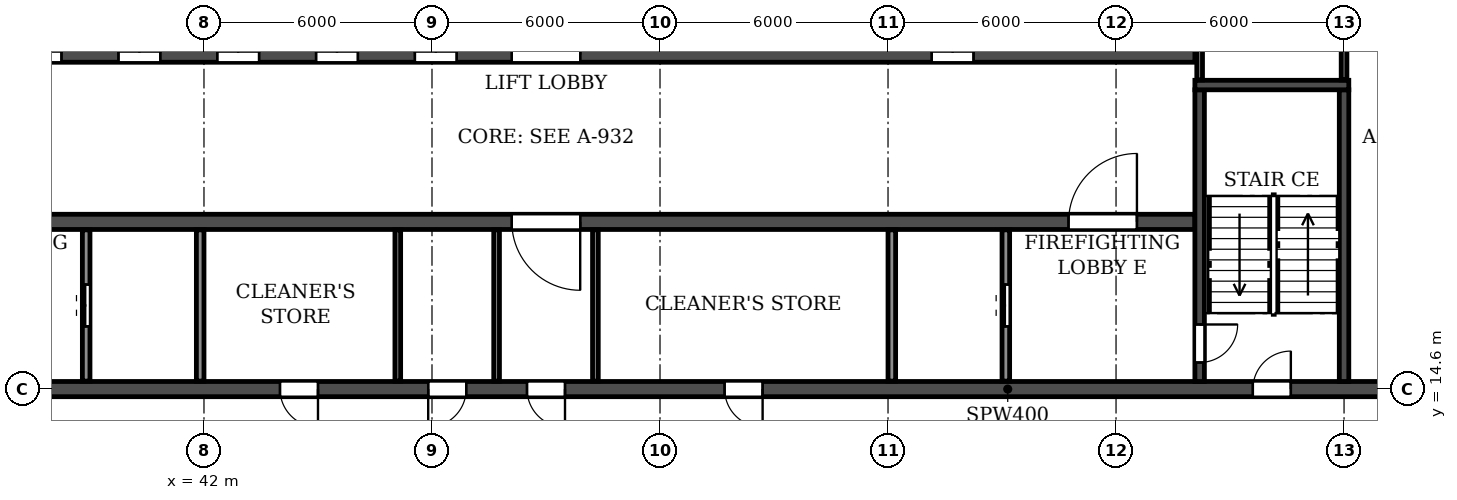
"""IFC4 building model, lengths in metres.
Left out: names, types, materials, properties, quantities, classifications, styles, units other than length and angle.
Written with IfcOpenShell. Run it as: python <this file> out.ifc"""

import sys

from ifc_helpers import new_model, si_unit, direction, frame, frame_2d, origin, place, context, subcontext, project, spatial, rectangle, extrude, element, fill, save


model = new_model("IFC4")
c1 = context("Model", 3, precision=1e-05, world=origin(), true_north=direction((0.0, 1.0)))
c2 = subcontext(c1, "Body", "Model", "MODEL_VIEW")
j1 = project(units=[si_unit("LENGTHUNIT", "METRE"), si_unit("PLANEANGLEUNIT", "RADIAN")], contexts=[c1])
p1 = place(None, origin())
s1 = spatial("IfcSite", under=j1, at=p1, CompositionType="ELEMENT")
p2 = place(p1, origin())
s2 = spatial("IfcBuilding", under=s1, at=p2, CompositionType="ELEMENT")
p3 = place(p2, frame((0.0, 0.0, 171.9)))
s3 = spatial("IfcBuildingStorey", under=s2, at=p3, CompositionType="ELEMENT", Elevation=171.9)
p4 = place(p3, frame((18.2, 14.6, 0.0), z_axis=(0.0, 0.0, 1.0), x_axis=(1.0, 0.0, 0.0)))
e1 = element("IfcWall", 1, at=p4, inside=s3, PredefinedType="SOLIDWALL", context=c2, shape_type="SweptSolid", body=[
    extrude(rectangle(XDim=65.6, YDim=0.4, at=frame_2d((32.8, 0.0))), origin(), (0.0, 0.0, 1.0), 3.08),
])
p5 = place(p4, frame((0.7, 0.0, 0.0)))
e2 = element("IfcOpeningElement", 2, at=p5, cuts=e1, PredefinedType="OPENING", context=c2, shape_type="SweptSolid", body=[
    extrude(rectangle(XDim=1.0, YDim=2.1, at=frame_2d((0.5, 1.05))), frame((0.0, 0.21, 0.0), z_axis=(0.0, -1.0, 0.0), x_axis=(1.0, 0.0, 0.0)), (0.0, 0.0, 1.0), 0.42),
])
p6 = place(p4, frame((8.6, 0.0, 0.0)))
e3 = element("IfcOpeningElement", 3, at=p6, cuts=e1, PredefinedType="OPENING", context=c2, shape_type="SweptSolid", body=[
    extrude(rectangle(XDim=1.0, YDim=2.1, at=frame_2d((0.5, 1.05))), frame((0.0, 0.21, 0.0), z_axis=(0.0, -1.0, 0.0), x_axis=(1.0, 0.0, 0.0)), (0.0, 0.0, 1.0), 0.42),
])
p7 = place(p4, frame((13.2, 0.0, 0.0)))
e4 = element("IfcOpeningElement", 4, at=p7, cuts=e1, PredefinedType="OPENING", context=c2, shape_type="SweptSolid", body=[
    extrude(rectangle(XDim=1.0, YDim=2.1, at=frame_2d((0.5, 1.05))), frame((0.0, 0.21, 0.0), z_axis=(0.0, -1.0, 0.0), x_axis=(1.0, 0.0, 0.0)), (0.0, 0.0, 1.0), 0.42),
])
p8 = place(p4, frame((25.8, 0.0, 0.0)))
e5 = element("IfcOpeningElement", 5, at=p8, cuts=e1, PredefinedType="OPENING", context=c2, shape_type="SweptSolid", body=[
    extrude(rectangle(XDim=1.0, YDim=2.1, at=frame_2d((0.5, 1.05))), frame((0.0, 0.21, 0.0), z_axis=(0.0, -1.0, 0.0), x_axis=(1.0, 0.0, 0.0)), (0.0, 0.0, 1.0), 0.42),
])
p9 = place(p4, frame((29.7, 0.0, 0.0)))
e6 = element("IfcOpeningElement", 6, at=p9, cuts=e1, PredefinedType="OPENING", context=c2, shape_type="SweptSolid", body=[
    extrude(rectangle(XDim=1.0, YDim=2.1, at=frame_2d((0.5, 1.05))), frame((0.0, 0.21, 0.0), z_axis=(0.0, -1.0, 0.0), x_axis=(1.0, 0.0, 0.0)), (0.0, 0.0, 1.0), 0.42),
])
p10 = place(p4, frame((32.3, 0.0, 0.0)))
e7 = element("IfcOpeningElement", 7, at=p10, cuts=e1, PredefinedType="OPENING", context=c2, shape_type="SweptSolid", body=[
    extrude(rectangle(XDim=1.0, YDim=2.1, at=frame_2d((0.5, 1.05))), frame((0.0, 0.21, 0.0), z_axis=(0.0, -1.0, 0.0), x_axis=(1.0, 0.0, 0.0)), (0.0, 0.0, 1.0), 0.42),
])
p11 = place(p4, frame((37.5, 0.0, 0.0)))
e8 = element("IfcOpeningElement", 8, at=p11, cuts=e1, PredefinedType="OPENING", context=c2, shape_type="SweptSolid", body=[
    extrude(rectangle(XDim=1.0, YDim=2.1, at=frame_2d((0.5, 1.05))), frame((0.0, 0.21, 0.0), z_axis=(0.0, -1.0, 0.0), x_axis=(1.0, 0.0, 0.0)), (0.0, 0.0, 1.0), 0.42),
])
p12 = place(p4, frame((51.4, 0.0, 0.0)))
e9 = element("IfcOpeningElement", 9, at=p12, cuts=e1, PredefinedType="OPENING", context=c2, shape_type="SweptSolid", body=[
    extrude(rectangle(XDim=1.0, YDim=2.1, at=frame_2d((0.5, 1.05))), frame((0.0, 0.21, 0.0), z_axis=(0.0, -1.0, 0.0), x_axis=(1.0, 0.0, 0.0)), (0.0, 0.0, 1.0), 0.42),
])
p13 = place(p4, frame((56.0, 0.0, 0.0)))
e10 = element("IfcOpeningElement", 10, at=p13, cuts=e1, PredefinedType="OPENING", context=c2, shape_type="SweptSolid", body=[
    extrude(rectangle(XDim=1.0, YDim=2.1, at=frame_2d((0.5, 1.05))), frame((0.0, 0.21, 0.0), z_axis=(0.0, -1.0, 0.0), x_axis=(1.0, 0.0, 0.0)), (0.0, 0.0, 1.0), 0.42),
])
p14 = place(p4, frame((63.9, 0.0, 0.0)))
e11 = element("IfcOpeningElement", 11, at=p14, cuts=e1, PredefinedType="OPENING", context=c2, shape_type="SweptSolid", body=[
    extrude(rectangle(XDim=1.0, YDim=2.1, at=frame_2d((0.5, 1.05))), frame((0.0, 0.21, 0.0), z_axis=(0.0, -1.0, 0.0), x_axis=(1.0, 0.0, 0.0)), (0.0, 0.0, 1.0), 0.42),
])
p15 = place(p3, frame((33.925, 19.0, 0.0), z_axis=(0.0, 0.0, 1.0), x_axis=(1.0, 0.0, 0.0)))
e12 = element("IfcWall", 12, at=p15, inside=s3, PredefinedType="SOLIDWALL", context=c2, shape_type="SweptSolid", body=[
    extrude(rectangle(XDim=34.15, YDim=0.4, at=frame_2d((17.075, 0.0))), origin(), (0.0, 0.0, 1.0), 3.08),
])
p16 = place(p15, frame((16.175, 0.0, 0.0)))
e13 = element("IfcOpeningElement", 13, at=p16, cuts=e12, PredefinedType="OPENING", context=c2, shape_type="SweptSolid", body=[
    extrude(rectangle(XDim=1.8, YDim=2.1, at=frame_2d((0.9, 1.05))), frame((0.0, 0.21, 0.0), z_axis=(0.0, -1.0, 0.0), x_axis=(1.0, 0.0, 0.0)), (0.0, 0.0, 1.0), 0.42),
])
p17 = place(p15, frame((1.525, 0.0, 0.0)))
e14 = element("IfcOpeningElement", 14, at=p17, cuts=e12, PredefinedType="OPENING", context=c2, shape_type="SweptSolid", body=[
    extrude(rectangle(XDim=1.8, YDim=2.1, at=frame_2d((0.9, 1.05))), frame((0.0, 0.21, 0.0), z_axis=(0.0, -1.0, 0.0), x_axis=(1.0, 0.0, 0.0)), (0.0, 0.0, 1.0), 0.42),
])
p18 = place(p15, frame((30.825, 0.0, 0.0)))
e15 = element("IfcOpeningElement", 15, at=p18, cuts=e12, PredefinedType="OPENING", context=c2, shape_type="SweptSolid", body=[
    extrude(rectangle(XDim=1.8, YDim=2.1, at=frame_2d((0.9, 1.05))), frame((0.0, 0.21, 0.0), z_axis=(0.0, -1.0, 0.0), x_axis=(1.0, 0.0, 0.0)), (0.0, 0.0, 1.0), 0.42),
])
p19 = place(p3, frame((33.925, 23.4, 0.0), z_axis=(0.0, 0.0, 1.0), x_axis=(1.0, 0.0, 0.0)))
e16 = element("IfcWall", 16, at=p19, inside=s3, PredefinedType="SOLIDWALL", context=c2, shape_type="SweptSolid", body=[
    extrude(rectangle(XDim=34.15, YDim=0.4, at=frame_2d((17.075, 0.0))), origin(), (0.0, 0.0, 1.0), 3.08),
])
p20 = place(p19, frame((16.175, 0.0, 0.0)))
e17 = element("IfcOpeningElement", 17, at=p20, cuts=e16, PredefinedType="OPENING", context=c2, shape_type="SweptSolid", body=[
    extrude(rectangle(XDim=1.8, YDim=2.1, at=frame_2d((0.9, 1.05))), frame((0.0, 0.21, 0.0), z_axis=(0.0, -1.0, 0.0), x_axis=(1.0, 0.0, 0.0)), (0.0, 0.0, 1.0), 0.42),
])
p21 = place(p19, frame((0.625, 0.0, 0.0)))
e18 = element("IfcOpeningElement", 18, at=p21, cuts=e16, PredefinedType="OPENING", context=c2, shape_type="SweptSolid", body=[
    extrude(rectangle(XDim=1.1, YDim=2.1, at=frame_2d((0.55, 1.05))), frame((0.0, 0.21, 0.0), z_axis=(0.0, -1.0, 0.0), x_axis=(1.0, 0.0, 0.0)), (0.0, 0.0, 1.0), 0.42),
])
p22 = place(p19, frame((3.225, 0.0, 0.0)))
e19 = element("IfcOpeningElement", 19, at=p22, cuts=e16, PredefinedType="OPENING", context=c2, shape_type="SweptSolid", body=[
    extrude(rectangle(XDim=1.1, YDim=2.1, at=frame_2d((0.55, 1.05))), frame((0.0, 0.21, 0.0), z_axis=(0.0, -1.0, 0.0), x_axis=(1.0, 0.0, 0.0)), (0.0, 0.0, 1.0), 0.42),
])
p23 = place(p19, frame((5.825, 0.0, 0.0)))
e20 = element("IfcOpeningElement", 20, at=p23, cuts=e16, PredefinedType="OPENING", context=c2, shape_type="SweptSolid", body=[
    extrude(rectangle(XDim=1.1, YDim=2.1, at=frame_2d((0.55, 1.05))), frame((0.0, 0.21, 0.0), z_axis=(0.0, -1.0, 0.0), x_axis=(1.0, 0.0, 0.0)), (0.0, 0.0, 1.0), 0.42),
])
p24 = place(p19, frame((8.425, 0.0, 0.0)))
e21 = element("IfcOpeningElement", 21, at=p24, cuts=e16, PredefinedType="OPENING", context=c2, shape_type="SweptSolid", body=[
    extrude(rectangle(XDim=1.1, YDim=2.1, at=frame_2d((0.55, 1.05))), frame((0.0, 0.21, 0.0), z_axis=(0.0, -1.0, 0.0), x_axis=(1.0, 0.0, 0.0)), (0.0, 0.0, 1.0), 0.42),
])
p25 = place(p19, frame((11.025, 0.0, 0.0)))
e22 = element("IfcOpeningElement", 22, at=p25, cuts=e16, PredefinedType="OPENING", context=c2, shape_type="SweptSolid", body=[
    extrude(rectangle(XDim=1.1, YDim=2.1, at=frame_2d((0.55, 1.05))), frame((0.0, 0.21, 0.0), z_axis=(0.0, -1.0, 0.0), x_axis=(1.0, 0.0, 0.0)), (0.0, 0.0, 1.0), 0.42),
])
p26 = place(p19, frame((13.625, 0.0, 0.0)))
e23 = element("IfcOpeningElement", 23, at=p26, cuts=e16, PredefinedType="OPENING", context=c2, shape_type="SweptSolid", body=[
    extrude(rectangle(XDim=1.1, YDim=2.1, at=frame_2d((0.55, 1.05))), frame((0.0, 0.21, 0.0), z_axis=(0.0, -1.0, 0.0), x_axis=(1.0, 0.0, 0.0)), (0.0, 0.0, 1.0), 0.42),
])
p27 = place(p19, frame((27.225, 0.0, 0.0)))
e24 = element("IfcOpeningElement", 24, at=p27, cuts=e16, PredefinedType="OPENING", context=c2, shape_type="SweptSolid", body=[
    extrude(rectangle(XDim=1.1, YDim=2.1, at=frame_2d((0.55, 1.05))), frame((0.0, 0.21, 0.0), z_axis=(0.0, -1.0, 0.0), x_axis=(1.0, 0.0, 0.0)), (0.0, 0.0, 1.0), 0.42),
])
p28 = place(p3, frame((68.2, 14.8, 0.0), z_axis=(0.0, 0.0, 1.0), x_axis=(0.0, 1.0, 0.0)))
e25 = element("IfcWall", 25, at=p28, inside=s3, PredefinedType="SOLIDWALL", context=c2, shape_type="SweptSolid", body=[
    extrude(rectangle(XDim=7.675, YDim=0.25, at=frame_2d((3.837, 0.0))), origin(), (0.0, 0.0, 1.0), 3.08),
])
p29 = place(p28, frame((0.5, 0.0, 0.0)))
e26 = element("IfcOpeningElement", 26, at=p29, cuts=e25, PredefinedType="OPENING", context=c2, shape_type="SweptSolid", body=[
    extrude(rectangle(XDim=1.0, YDim=2.1, at=frame_2d((0.5, 1.05))), frame((0.0, 0.135, 0.0), z_axis=(0.0, -1.0, 0.0), x_axis=(1.0, 0.0, 0.0)), (0.0, 0.0, 1.0), 0.27),
])
p30 = place(p3, frame((72.0, 14.8, 0.0), z_axis=(0.0, 0.0, 1.0), x_axis=(0.0, 1.0, 0.0)))
e27 = element("IfcWall", 27, at=p30, inside=s3, PredefinedType="SOLIDWALL", context=c2, shape_type="SweptSolid", body=[
    extrude(rectangle(XDim=7.675, YDim=0.25, at=frame_2d((3.837, 0.0))), origin(), (0.0, 0.0, 1.0), 3.08),
])
p31 = place(p3, frame((68.075, 22.6, 0.0), z_axis=(0.0, 0.0, 1.0), x_axis=(1.0, 0.0, 0.0)))
e28 = element("IfcWall", 28, at=p31, inside=s3, PredefinedType="SOLIDWALL", context=c2, shape_type="SweptSolid", body=[
    extrude(rectangle(XDim=4.05, YDim=0.25, at=frame_2d((2.025, 0.0))), origin(), (0.0, 0.0, 1.0), 3.08),
])
for number, where, z_axis, x_axis in (
    (29, (49.7, 14.81, 0.0), (0.0, 0.0, 1.0), (0.0, 1.0, 0.0)),
    (30, (52.3, 14.81, 0.0), (0.0, 0.0, 1.0), (0.0, 1.0, 0.0)),
    (31, (47.1, 14.81, 0.0), (0.0, 0.0, 1.0), (0.0, 1.0, 0.0)),
):
    element("IfcWall", number, at=place(p3, frame(where, z_axis=z_axis, x_axis=x_axis)), inside=s3, PredefinedType="PARTITIONING", context=c2, shape_type="SweptSolid", body=[
        extrude(rectangle(XDim=3.98, YDim=0.15, at=frame_2d((1.99, 0.0))), origin(), (0.0, 0.0, 1.0), 3.08),
    ])
for number, where, z_axis, x_axis in (
    (32, (68.2, 22.735, 0.0), (0.0, 0.0, 1.0), (0.0, 1.0, 0.0)),
    (33, (72.0, 22.735, 0.0), (0.0, 0.0, 1.0), (0.0, 1.0, 0.0)),
):
    element("IfcWall", number, at=place(p3, frame(where, z_axis=z_axis, x_axis=x_axis)), inside=s3, PredefinedType="PARTITIONING", context=c2, shape_type="SweptSolid", body=[
        extrude(rectangle(XDim=4.855, YDim=0.15, at=frame_2d((2.427, 0.0))), origin(), (0.0, 0.0, 1.0), 3.08),
    ])
p32 = place(p3, frame((38.9, 14.81, 0.0), z_axis=(0.0, 0.0, 1.0), x_axis=(0.0, 1.0, 0.0)))
e34 = element("IfcWall", 34, at=p32, inside=s3, PredefinedType="PARTITIONING", context=c2, shape_type="SweptSolid", body=[
    extrude(rectangle(XDim=3.98, YDim=0.2, at=frame_2d((1.99, 0.0))), origin(), (0.0, 0.0, 1.0), 3.08),
])
p33 = place(p32, frame((1.44, 0.0, 0.0)))
e35 = element("IfcOpeningElement", 35, at=p33, cuts=e34, PredefinedType="OPENING", context=c2, shape_type="SweptSolid", body=[
    extrude(rectangle(XDim=1.1, YDim=2.1, at=frame_2d((0.55, 1.05))), frame((0.0, 0.11, 0.0), z_axis=(0.0, -1.0, 0.0), x_axis=(1.0, 0.0, 0.0)), (0.0, 0.0, 1.0), 0.22),
])
for number, where, z_axis, x_axis in (
    (36, (41.9, 14.81, 0.0), (0.0, 0.0, 1.0), (0.0, 1.0, 0.0)),
    (37, (60.1, 14.81, 0.0), (0.0, 0.0, 1.0), (0.0, 1.0, 0.0)),
):
    element("IfcWall", number, at=place(p3, frame(where, z_axis=z_axis, x_axis=x_axis)), inside=s3, PredefinedType="PARTITIONING", context=c2, shape_type="SweptSolid", body=[
        extrude(rectangle(XDim=3.98, YDim=0.2, at=frame_2d((1.99, 0.0))), origin(), (0.0, 0.0, 1.0), 3.08),
    ])
p34 = place(p3, frame((63.1, 14.81, 0.0), z_axis=(0.0, 0.0, 1.0), x_axis=(0.0, 1.0, 0.0)))
e38 = element("IfcWall", 38, at=p34, inside=s3, PredefinedType="PARTITIONING", context=c2, shape_type="SweptSolid", body=[
    extrude(rectangle(XDim=3.98, YDim=0.2, at=frame_2d((1.99, 0.0))), origin(), (0.0, 0.0, 1.0), 3.08),
])
p35 = place(p34, frame((1.44, 0.0, 0.0)))
e39 = element("IfcOpeningElement", 39, at=p35, cuts=e38, PredefinedType="OPENING", context=c2, shape_type="SweptSolid", body=[
    extrude(rectangle(XDim=1.1, YDim=2.1, at=frame_2d((0.55, 1.05))), frame((0.0, 0.11, 0.0), z_axis=(0.0, -1.0, 0.0), x_axis=(1.0, 0.0, 0.0)), (0.0, 0.0, 1.0), 0.22),
])
p36 = place(p8, frame((1.0, 0.0, 0.0), z_axis=(0.0, 0.0, 1.0), x_axis=(-1.0, 0.0, 0.0)))
e40 = element("IfcDoor", 40, at=p36, inside=s3, OperationType="SINGLE_SWING_LEFT", PredefinedType="DOOR", context=c2, shape_type="SweptSolid", body=[
    extrude(rectangle(XDim=1.0, YDim=2.1, at=frame_2d((0.5, 1.05))), frame((0.0, 0.025, 0.0), z_axis=(0.0, -1.0, 0.0), x_axis=(1.0, 0.0, 0.0)), (0.0, 0.0, 1.0), 0.05),
])
fill(e5, e40)
p37 = place(p9, frame((1.0, 0.0, 0.0), z_axis=(0.0, 0.0, 1.0), x_axis=(-1.0, 0.0, 0.0)))
e41 = element("IfcDoor", 41, at=p37, inside=s3, OperationType="SINGLE_SWING_RIGHT", PredefinedType="DOOR", context=c2, shape_type="SweptSolid", body=[
    extrude(rectangle(XDim=1.0, YDim=2.1, at=frame_2d((0.5, 1.05))), frame((0.0, 0.025, 0.0), z_axis=(0.0, -1.0, 0.0), x_axis=(1.0, 0.0, 0.0)), (0.0, 0.0, 1.0), 0.05),
])
fill(e6, e41)
p38 = place(p10, frame((1.0, 0.0, 0.0), z_axis=(0.0, 0.0, 1.0), x_axis=(-1.0, 0.0, 0.0)))
e42 = element("IfcDoor", 42, at=p38, inside=s3, OperationType="SINGLE_SWING_LEFT", PredefinedType="DOOR", context=c2, shape_type="SweptSolid", body=[
    extrude(rectangle(XDim=1.0, YDim=2.1, at=frame_2d((0.5, 1.05))), frame((0.0, 0.025, 0.0), z_axis=(0.0, -1.0, 0.0), x_axis=(1.0, 0.0, 0.0)), (0.0, 0.0, 1.0), 0.05),
])
fill(e7, e42)
p39 = place(p11, frame((1.0, 0.0, 0.0), z_axis=(0.0, 0.0, 1.0), x_axis=(-1.0, 0.0, 0.0)))
e43 = element("IfcDoor", 43, at=p39, inside=s3, OperationType="SINGLE_SWING_LEFT", PredefinedType="DOOR", context=c2, shape_type="SweptSolid", body=[
    extrude(rectangle(XDim=1.0, YDim=2.1, at=frame_2d((0.5, 1.05))), frame((0.0, 0.025, 0.0), z_axis=(0.0, -1.0, 0.0), x_axis=(1.0, 0.0, 0.0)), (0.0, 0.0, 1.0), 0.05),
])
fill(e8, e43)
p40 = place(p12, origin())
e44 = element("IfcDoor", 44, at=p40, inside=s3, OperationType="SINGLE_SWING_RIGHT", PredefinedType="DOOR", context=c2, shape_type="SweptSolid", body=[
    extrude(rectangle(XDim=1.0, YDim=2.1, at=frame_2d((0.5, 1.05))), frame((0.0, 0.025, 0.0), z_axis=(0.0, -1.0, 0.0), x_axis=(1.0, 0.0, 0.0)), (0.0, 0.0, 1.0), 0.05),
])
fill(e9, e44)
p41 = place(p35, origin())
e45 = element("IfcDoor", 45, at=p41, inside=s3, OperationType="DOUBLE_DOOR_SLIDING", PredefinedType="DOOR", context=c2, shape_type="SweptSolid", body=[
    extrude(rectangle(XDim=1.1, YDim=2.1, at=frame_2d((0.55, 1.05))), frame((0.0, 0.025, 0.0), z_axis=(0.0, -1.0, 0.0), x_axis=(1.0, 0.0, 0.0)), (0.0, 0.0, 1.0), 0.05),
])
fill(e39, e45)
p42 = place(p29, frame((1.0, 0.0, 0.0), z_axis=(0.0, 0.0, 1.0), x_axis=(-1.0, 0.0, 0.0)))
e46 = element("IfcDoor", 46, at=p42, inside=s3, OperationType="SINGLE_SWING_LEFT", PredefinedType="DOOR", context=c2, shape_type="SweptSolid", body=[
    extrude(rectangle(XDim=1.0, YDim=2.1, at=frame_2d((0.5, 1.05))), frame((0.0, 0.025, 0.0), z_axis=(0.0, -1.0, 0.0), x_axis=(1.0, 0.0, 0.0)), (0.0, 0.0, 1.0), 0.05),
])
fill(e26, e46)
p43 = place(p33, origin())
e47 = element("IfcDoor", 47, at=p43, inside=s3, OperationType="DOUBLE_DOOR_SLIDING", PredefinedType="DOOR", context=c2, shape_type="SweptSolid", body=[
    extrude(rectangle(XDim=1.1, YDim=2.1, at=frame_2d((0.55, 1.05))), frame((0.0, 0.025, 0.0), z_axis=(0.0, -1.0, 0.0), x_axis=(1.0, 0.0, 0.0)), (0.0, 0.0, 1.0), 0.05),
])
fill(e35, e47)
p44 = place(p20, origin())
e48 = element("IfcDoor", 48, at=p44, inside=s3, OperationType="DOUBLE_DOOR_SINGLE_SWING", PredefinedType="DOOR", context=c2, shape_type="SweptSolid", body=[
    extrude(rectangle(XDim=1.8, YDim=2.1, at=frame_2d((0.9, 1.05))), frame((0.0, 0.025, 0.0), z_axis=(0.0, -1.0, 0.0), x_axis=(1.0, 0.0, 0.0)), (0.0, 0.0, 1.0), 0.05),
])
fill(e17, e48)
p45 = place(p16, frame((1.8, 0.0, 0.0), z_axis=(0.0, 0.0, 1.0), x_axis=(-1.0, 0.0, 0.0)))
e49 = element("IfcDoor", 49, at=p45, inside=s3, OperationType="DOUBLE_DOOR_SINGLE_SWING", PredefinedType="DOOR", context=c2, shape_type="SweptSolid", body=[
    extrude(rectangle(XDim=1.8, YDim=2.1, at=frame_2d((0.9, 1.05))), frame((0.0, 0.025, 0.0), z_axis=(0.0, -1.0, 0.0), x_axis=(1.0, 0.0, 0.0)), (0.0, 0.0, 1.0), 0.05),
])
fill(e13, e49)
p46 = place(p22, origin())
e50 = element("IfcDoor", 50, at=p46, inside=s3, OperationType="DOUBLE_DOOR_SLIDING", PredefinedType="DOOR", context=c2, shape_type="SweptSolid", body=[
    extrude(rectangle(XDim=1.1, YDim=2.1, at=frame_2d((0.55, 1.05))), frame((0.0, 0.025, 0.0), z_axis=(0.0, -1.0, 0.0), x_axis=(1.0, 0.0, 0.0)), (0.0, 0.0, 1.0), 0.05),
])
fill(e19, e50)
p47 = place(p23, origin())
e51 = element("IfcDoor", 51, at=p47, inside=s3, OperationType="DOUBLE_DOOR_SLIDING", PredefinedType="DOOR", context=c2, shape_type="SweptSolid", body=[
    extrude(rectangle(XDim=1.1, YDim=2.1, at=frame_2d((0.55, 1.05))), frame((0.0, 0.025, 0.0), z_axis=(0.0, -1.0, 0.0), x_axis=(1.0, 0.0, 0.0)), (0.0, 0.0, 1.0), 0.05),
])
fill(e20, e51)
p48 = place(p24, origin())
e52 = element("IfcDoor", 52, at=p48, inside=s3, OperationType="DOUBLE_DOOR_SLIDING", PredefinedType="DOOR", context=c2, shape_type="SweptSolid", body=[
    extrude(rectangle(XDim=1.1, YDim=2.1, at=frame_2d((0.55, 1.05))), frame((0.0, 0.025, 0.0), z_axis=(0.0, -1.0, 0.0), x_axis=(1.0, 0.0, 0.0)), (0.0, 0.0, 1.0), 0.05),
])
fill(e21, e52)
p49 = place(p25, origin())
e53 = element("IfcDoor", 53, at=p49, inside=s3, OperationType="DOUBLE_DOOR_SLIDING", PredefinedType="DOOR", context=c2, shape_type="SweptSolid", body=[
    extrude(rectangle(XDim=1.1, YDim=2.1, at=frame_2d((0.55, 1.05))), frame((0.0, 0.025, 0.0), z_axis=(0.0, -1.0, 0.0), x_axis=(1.0, 0.0, 0.0)), (0.0, 0.0, 1.0), 0.05),
])
fill(e22, e53)
p50 = place(p26, origin())
e54 = element("IfcDoor", 54, at=p50, inside=s3, OperationType="DOUBLE_DOOR_SLIDING", PredefinedType="DOOR", context=c2, shape_type="SweptSolid", body=[
    extrude(rectangle(XDim=1.1, YDim=2.1, at=frame_2d((0.55, 1.05))), frame((0.0, 0.025, 0.0), z_axis=(0.0, -1.0, 0.0), x_axis=(1.0, 0.0, 0.0)), (0.0, 0.0, 1.0), 0.05),
])
fill(e23, e54)
p51 = place(p27, origin())
e55 = element("IfcDoor", 55, at=p51, inside=s3, OperationType="DOUBLE_DOOR_SLIDING", PredefinedType="DOOR", context=c2, shape_type="SweptSolid", body=[
    extrude(rectangle(XDim=1.1, YDim=2.1, at=frame_2d((0.55, 1.05))), frame((0.0, 0.025, 0.0), z_axis=(0.0, -1.0, 0.0), x_axis=(1.0, 0.0, 0.0)), (0.0, 0.0, 1.0), 0.05),
])
fill(e24, e55)
p52 = place(p18, origin())
e56 = element("IfcDoor", 56, at=p52, inside=s3, OperationType="DOUBLE_DOOR_SINGLE_SWING", PredefinedType="DOOR", context=c2, shape_type="SweptSolid", body=[
    extrude(rectangle(XDim=1.8, YDim=2.1, at=frame_2d((0.9, 1.05))), frame((0.0, 0.025, 0.0), z_axis=(0.0, -1.0, 0.0), x_axis=(1.0, 0.0, 0.0)), (0.0, 0.0, 1.0), 0.05),
])
fill(e15, e56)
save(model, sys.argv[1])
